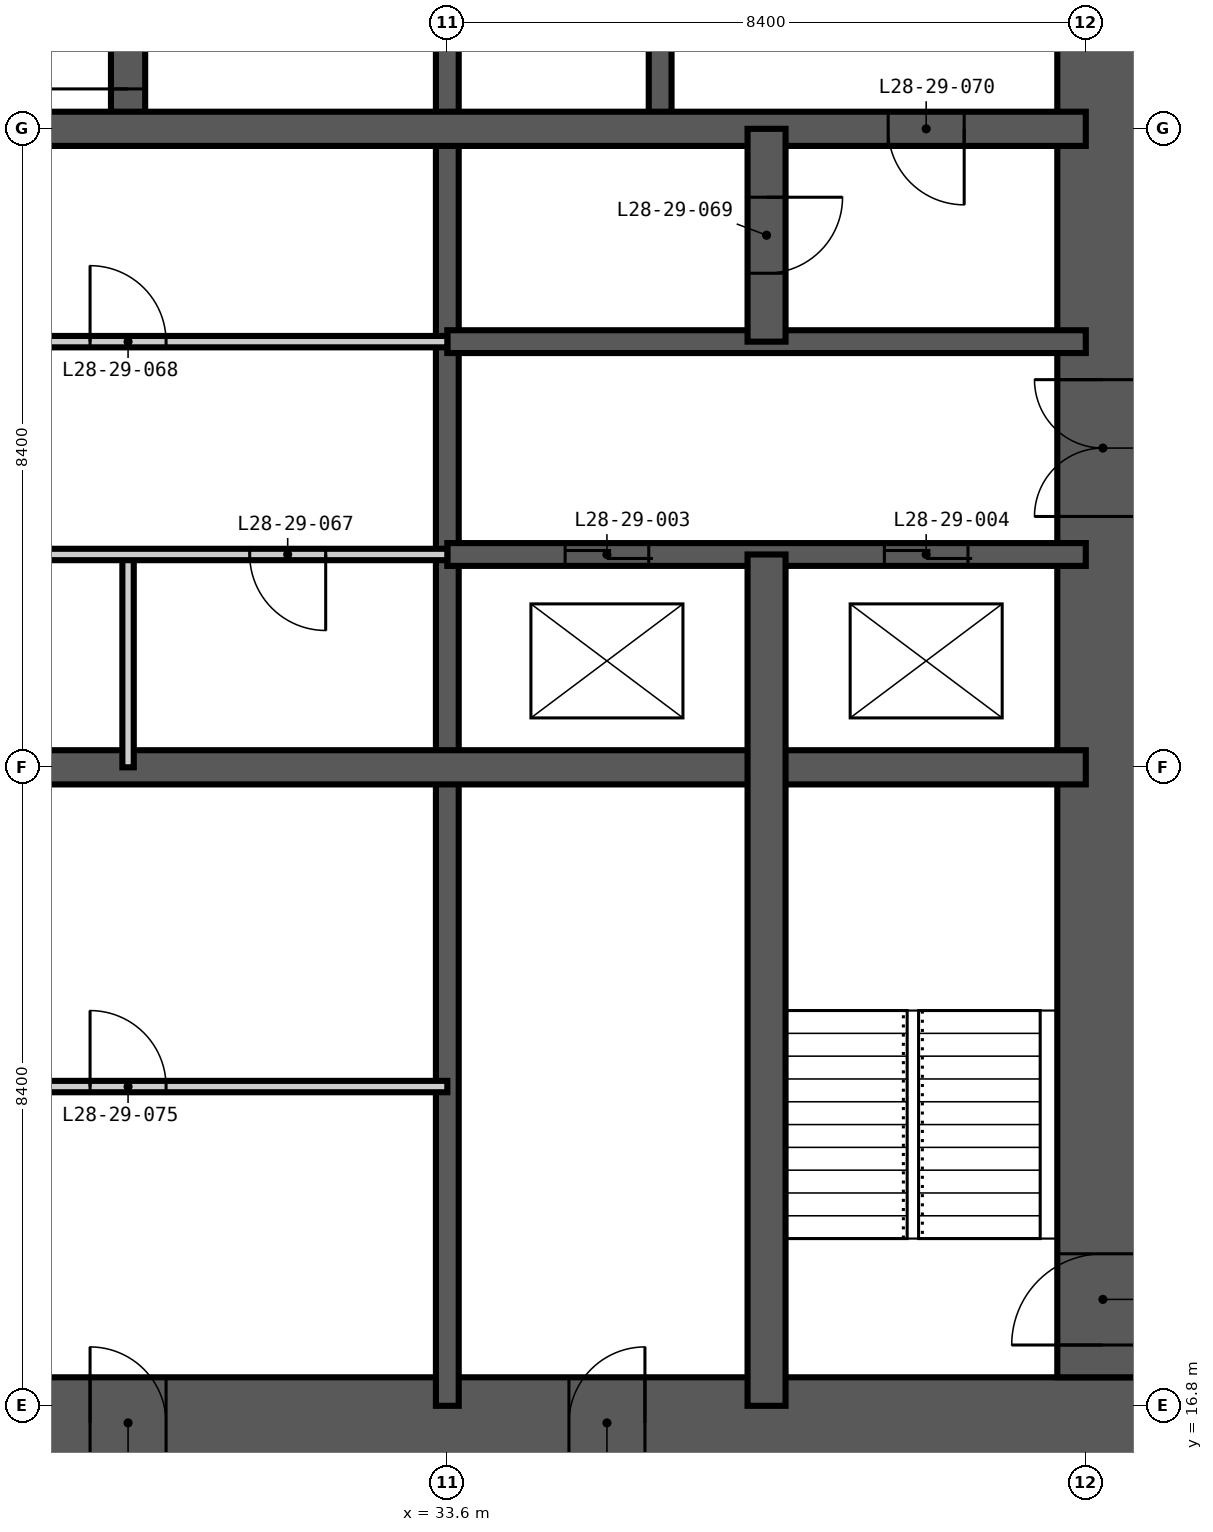
"""IFC4 building model, lengths in metres.
Left out: names, types, materials, properties, quantities, classifications, styles, units other than length and angle.
Written with IfcOpenShell. Run it as: python <this file> out.ifc"""

import sys

from ifc_helpers import new_model, si_unit, direction, frame, frame_2d, origin, place, context, subcontext, project, spatial, rectangle, extrude, element, fill, save


model = new_model("IFC4")
c1 = context("Model", 3, precision=1e-05, world=origin(), true_north=direction((0.0, 1.0)))
c2 = subcontext(c1, "Body", "Model", "MODEL_VIEW")
j1 = project(units=[si_unit("LENGTHUNIT", "METRE"), si_unit("PLANEANGLEUNIT", "RADIAN")], contexts=[c1])
p1 = place(None, origin())
s1 = spatial("IfcSite", under=j1, at=p1, CompositionType="ELEMENT")
p2 = place(p1, origin())
s2 = spatial("IfcBuilding", under=s1, at=p2, CompositionType="ELEMENT")
p3 = place(p2, frame((0.0, 0.0, 111.6)))
s3 = spatial("IfcBuildingStorey", under=s2, at=p3, CompositionType="ELEMENT", Elevation=111.6)
p4 = place(p3, frame((15.975, 16.575, -0.35), z_axis=(0.0, 0.0, 1.0), x_axis=(1.0, 0.0, 0.0)))
e1 = element("IfcWall", 1, at=p4, inside=s3, PredefinedType="SHEAR", context=c2, shape_type="SweptSolid", body=[
    extrude(rectangle(XDim=26.85, YDim=1.2, at=frame_2d((13.425, 0.0))), origin(), (0.0, 0.0, 1.0), 3.6),
])
p5 = place(p4, frame((12.925, 0.0, 0.35)))
e2 = element("IfcOpeningElement", 2, at=p5, cuts=e1, PredefinedType="OPENING", context=c2, shape_type="SweptSolid", body=[
    extrude(rectangle(XDim=1.0, YDim=2.1, at=frame_2d((0.5, 1.05))), frame((0.0, 0.61, 0.0), z_axis=(0.0, -1.0, 0.0), x_axis=(1.0, 0.0, 0.0)), (0.0, 0.0, 1.0), 1.22),
])
p6 = place(p4, frame((19.225, 0.0, 0.35)))
e3 = element("IfcOpeningElement", 3, at=p6, cuts=e1, PredefinedType="OPENING", context=c2, shape_type="SweptSolid", body=[
    extrude(rectangle(XDim=1.0, YDim=2.1, at=frame_2d((0.5, 1.05))), frame((0.0, 0.61, 0.0), z_axis=(0.0, -1.0, 0.0), x_axis=(1.0, 0.0, 0.0)), (0.0, 0.0, 1.0), 1.22),
])
p7 = place(p3, frame((42.225, 17.175, -0.35), z_axis=(0.0, 0.0, 1.0), x_axis=(0.0, 1.0, 0.0)))
e4 = element("IfcWall", 4, at=p7, inside=s3, PredefinedType="SHEAR", context=c2, shape_type="SweptSolid", body=[
    extrude(rectangle(XDim=24.45, YDim=1.2, at=frame_2d((12.225, 0.0))), origin(), (0.0, 0.0, 1.0), 3.6),
])
p8 = place(p7, frame((0.425, 0.0, 0.35)))
e5 = element("IfcOpeningElement", 5, at=p8, cuts=e4, PredefinedType="OPENING", context=c2, shape_type="SweptSolid", body=[
    extrude(rectangle(XDim=1.2, YDim=2.2, at=frame_2d((0.6, 1.1))), frame((0.0, 0.61, 0.0), z_axis=(0.0, -1.0, 0.0), x_axis=(1.0, 0.0, 0.0)), (0.0, 0.0, 1.0), 1.22),
])
p9 = place(p7, frame((11.325, 0.0, 0.35)))
e6 = element("IfcOpeningElement", 6, at=p9, cuts=e4, PredefinedType="OPENING", context=c2, shape_type="SweptSolid", body=[
    extrude(rectangle(XDim=1.8, YDim=2.2, at=frame_2d((0.9, 1.1))), frame((0.0, 0.61, 0.0), z_axis=(0.0, -1.0, 0.0), x_axis=(1.0, 0.0, 0.0)), (0.0, 0.0, 1.0), 1.22),
])
p10 = place(p7, frame((20.125, 0.0, 0.35)))
e7 = element("IfcOpeningElement", 7, at=p10, cuts=e4, PredefinedType="OPENING", context=c2, shape_type="SweptSolid", body=[
    extrude(rectangle(XDim=1.0, YDim=2.1, at=frame_2d((0.5, 1.05))), frame((0.0, 0.61, 0.0), z_axis=(0.0, -1.0, 0.0), x_axis=(1.0, 0.0, 0.0)), (0.0, 0.0, 1.0), 1.22),
])
p11 = place(p3, frame((33.6, 16.8, -0.35), z_axis=(0.0, 0.0, 1.0), x_axis=(0.0, 1.0, 0.0)))
e8 = element("IfcWall", 8, at=p11, inside=s3, PredefinedType="SHEAR", context=c2, shape_type="SweptSolid", body=[
    extrude(rectangle(XDim=25.2, YDim=0.3, at=frame_2d((12.6, 0.0))), origin(), (0.0, 0.0, 1.0), 3.6),
])
p12 = place(p11, frame((22.5, 0.0, 0.35)))
e9 = element("IfcOpeningElement", 9, at=p12, cuts=e8, PredefinedType="OPENING", context=c2, shape_type="SweptSolid", body=[
    extrude(rectangle(XDim=1.2, YDim=2.2, at=frame_2d((0.6, 1.1))), frame((0.0, 0.16, 0.0), z_axis=(0.0, -1.0, 0.0), x_axis=(1.0, 0.0, 0.0)), (0.0, 0.0, 1.0), 0.32),
])
p13 = place(p11, frame((18.3, 0.0, 0.35)))
e10 = element("IfcOpeningElement", 10, at=p13, cuts=e8, PredefinedType="OPENING", context=c2, shape_type="SweptSolid", body=[
    extrude(rectangle(XDim=1.2, YDim=2.2, at=frame_2d((0.6, 1.1))), frame((0.0, 0.16, 0.0), z_axis=(0.0, -1.0, 0.0), x_axis=(1.0, 0.0, 0.0)), (0.0, 0.0, 1.0), 0.32),
])
p14 = place(p3, frame((36.4, 33.6, -0.35), z_axis=(0.0, 0.0, 1.0), x_axis=(0.0, 1.0, 0.0)))
e11 = element("IfcWall", 11, at=p14, inside=s3, PredefinedType="SHEAR", context=c2, shape_type="SweptSolid", body=[
    extrude(rectangle(XDim=8.4, YDim=0.3, at=frame_2d((4.2, 0.0))), origin(), (0.0, 0.0, 1.0), 3.6),
])
p15 = place(p3, frame((33.6, 28.0, -0.35), z_axis=(0.0, 0.0, 1.0), x_axis=(1.0, 0.0, 0.0)))
e12 = element("IfcWall", 12, at=p15, inside=s3, PredefinedType="SHEAR", context=c2, shape_type="SweptSolid", body=[
    extrude(rectangle(XDim=8.4, YDim=0.3, at=frame_2d((4.2, 0.0))), origin(), (0.0, 0.0, 1.0), 3.6),
])
p16 = place(p15, frame((1.55, 0.0, 0.35)))
e13 = element("IfcOpeningElement", 13, at=p16, cuts=e12, PredefinedType="OPENING", context=c2, shape_type="SweptSolid", body=[
    extrude(rectangle(XDim=1.1, YDim=2.2, at=frame_2d((0.55, 1.1))), frame((0.0, 0.16, 0.0), z_axis=(0.0, -1.0, 0.0), x_axis=(1.0, 0.0, 0.0)), (0.0, 0.0, 1.0), 0.32),
])
p17 = place(p15, frame((5.75, 0.0, 0.35)))
e14 = element("IfcOpeningElement", 14, at=p17, cuts=e12, PredefinedType="OPENING", context=c2, shape_type="SweptSolid", body=[
    extrude(rectangle(XDim=1.1, YDim=2.2, at=frame_2d((0.55, 1.1))), frame((0.0, 0.16, 0.0), z_axis=(0.0, -1.0, 0.0), x_axis=(1.0, 0.0, 0.0)), (0.0, 0.0, 1.0), 0.32),
])
p18 = place(p3, frame((33.6, 30.8, -0.35), z_axis=(0.0, 0.0, 1.0), x_axis=(1.0, 0.0, 0.0)))
e15 = element("IfcWall", 15, at=p18, inside=s3, PredefinedType="SHEAR", context=c2, shape_type="SweptSolid", body=[
    extrude(rectangle(XDim=8.4, YDim=0.3, at=frame_2d((4.2, 0.0))), origin(), (0.0, 0.0, 1.0), 3.6),
])
p19 = place(p3, frame((29.4, 33.6, -0.35), z_axis=(0.0, 0.0, 1.0), x_axis=(0.0, 1.0, 0.0)))
e16 = element("IfcWall", 16, at=p19, inside=s3, PredefinedType="SHEAR", context=c2, shape_type="SweptSolid", body=[
    extrude(rectangle(XDim=8.4, YDim=0.45, at=frame_2d((4.2, 0.0))), origin(), (0.0, 0.0, 1.0), 3.6),
])
p20 = place(p19, frame((0.525, 0.0, 0.35)))
e17 = element("IfcOpeningElement", 17, at=p20, cuts=e16, PredefinedType="OPENING", context=c2, shape_type="SweptSolid", body=[
    extrude(rectangle(XDim=1.2, YDim=2.2, at=frame_2d((0.6, 1.1))), frame((0.0, 0.235, 0.0), z_axis=(0.0, -1.0, 0.0), x_axis=(1.0, 0.0, 0.0)), (0.0, 0.0, 1.0), 0.47),
])
p21 = place(p3, frame((16.8, 25.2, -0.35), z_axis=(0.0, 0.0, 1.0), x_axis=(1.0, 0.0, 0.0)))
e18 = element("IfcWall", 18, at=p21, inside=s3, PredefinedType="SHEAR", context=c2, shape_type="SweptSolid", body=[
    extrude(rectangle(XDim=25.2, YDim=0.45, at=frame_2d((12.6, 0.0))), origin(), (0.0, 0.0, 1.0), 3.6),
])
p22 = place(p3, frame((16.8, 33.6, -0.35), z_axis=(0.0, 0.0, 1.0), x_axis=(1.0, 0.0, 0.0)))
e19 = element("IfcWall", 19, at=p22, inside=s3, PredefinedType="SHEAR", context=c2, shape_type="SweptSolid", body=[
    extrude(rectangle(XDim=25.2, YDim=0.45, at=frame_2d((12.6, 0.0))), origin(), (0.0, 0.0, 1.0), 3.6),
])
p23 = place(p22, frame((22.6, 0.0, 0.35)))
e20 = element("IfcOpeningElement", 20, at=p23, cuts=e19, PredefinedType="OPENING", context=c2, shape_type="SweptSolid", body=[
    extrude(rectangle(XDim=1.0, YDim=2.1, at=frame_2d((0.5, 1.05))), frame((0.0, 0.235, 0.0), z_axis=(0.0, -1.0, 0.0), x_axis=(1.0, 0.0, 0.0)), (0.0, 0.0, 1.0), 0.47),
])
p24 = place(p3, frame((37.8, 16.8, -0.35), z_axis=(0.0, 0.0, 1.0), x_axis=(0.0, 1.0, 0.0)))
e21 = element("IfcWall", 21, at=p24, inside=s3, PredefinedType="SHEAR", context=c2, shape_type="SweptSolid", body=[
    extrude(rectangle(XDim=11.2, YDim=0.5, at=frame_2d((5.6, 0.0))), origin(), (0.0, 0.0, 1.0), 3.6),
])
p25 = place(p3, frame((37.8, 30.8, -0.35), z_axis=(0.0, 0.0, 1.0), x_axis=(0.0, 1.0, 0.0)))
e22 = element("IfcWall", 22, at=p25, inside=s3, PredefinedType="SHEAR", context=c2, shape_type="SweptSolid", body=[
    extrude(rectangle(XDim=2.8, YDim=0.5, at=frame_2d((1.4, 0.0))), origin(), (0.0, 0.0, 1.0), 3.6),
])
p26 = place(p25, frame((0.9, 0.0, 0.35)))
e23 = element("IfcOpeningElement", 23, at=p26, cuts=e22, PredefinedType="OPENING", context=c2, shape_type="SweptSolid", body=[
    extrude(rectangle(XDim=1.0, YDim=2.1, at=frame_2d((0.5, 1.05))), frame((0.0, 0.26, 0.0), z_axis=(0.0, -1.0, 0.0), x_axis=(1.0, 0.0, 0.0)), (0.0, 0.0, 1.0), 0.52),
])
p27 = place(p3, frame((29.4, 25.2, 0.0), z_axis=(0.0, 0.0, 1.0), x_axis=(0.0, 1.0, 0.0)))
e24 = element("IfcWall", 24, at=p27, inside=s3, PredefinedType="PARTITIONING", context=c2, shape_type="SweptSolid", body=[
    extrude(rectangle(XDim=2.8, YDim=0.15, at=frame_2d((1.4, 0.0))), origin(), (0.0, 0.0, 1.0), 3.25),
])
p28 = place(p3, frame((25.2, 21.0, 0.0), z_axis=(0.0, 0.0, 1.0), x_axis=(1.0, 0.0, 0.0)))
e25 = element("IfcWall", 25, at=p28, inside=s3, PredefinedType="PARTITIONING", context=c2, shape_type="SweptSolid", body=[
    extrude(rectangle(XDim=8.4, YDim=0.15, at=frame_2d((4.2, 0.0))), origin(), (0.0, 0.0, 1.0), 3.25),
])
p29 = place(p28, frame((3.7, 0.0, 0.0)))
e26 = element("IfcOpeningElement", 26, at=p29, cuts=e25, PredefinedType="OPENING", context=c2, shape_type="SweptSolid", body=[
    extrude(rectangle(XDim=1.0, YDim=2.1, at=frame_2d((0.5, 1.05))), frame((0.0, 0.085, 0.0), z_axis=(0.0, -1.0, 0.0), x_axis=(1.0, 0.0, 0.0)), (0.0, 0.0, 1.0), 0.17),
])
p30 = place(p3, frame((25.2, 28.0, 0.0), z_axis=(0.0, 0.0, 1.0), x_axis=(1.0, 0.0, 0.0)))
e27 = element("IfcWall", 27, at=p30, inside=s3, PredefinedType="PARTITIONING", context=c2, shape_type="SweptSolid", body=[
    extrude(rectangle(XDim=8.4, YDim=0.15, at=frame_2d((4.2, 0.0))), origin(), (0.0, 0.0, 1.0), 3.25),
])
p31 = place(p30, frame((1.6, 0.0, 0.0)))
e28 = element("IfcOpeningElement", 28, at=p31, cuts=e27, PredefinedType="OPENING", context=c2, shape_type="SweptSolid", body=[
    extrude(rectangle(XDim=1.0, YDim=2.1, at=frame_2d((0.5, 1.05))), frame((0.0, 0.085, 0.0), z_axis=(0.0, -1.0, 0.0), x_axis=(1.0, 0.0, 0.0)), (0.0, 0.0, 1.0), 0.17),
])
p32 = place(p30, frame((5.8, 0.0, 0.0)))
e29 = element("IfcOpeningElement", 29, at=p32, cuts=e27, PredefinedType="OPENING", context=c2, shape_type="SweptSolid", body=[
    extrude(rectangle(XDim=1.0, YDim=2.1, at=frame_2d((0.5, 1.05))), frame((0.0, 0.085, 0.0), z_axis=(0.0, -1.0, 0.0), x_axis=(1.0, 0.0, 0.0)), (0.0, 0.0, 1.0), 0.17),
])
p33 = place(p3, frame((25.2, 30.8, 0.0), z_axis=(0.0, 0.0, 1.0), x_axis=(1.0, 0.0, 0.0)))
e30 = element("IfcWall", 30, at=p33, inside=s3, PredefinedType="PARTITIONING", context=c2, shape_type="SweptSolid", body=[
    extrude(rectangle(XDim=8.4, YDim=0.15, at=frame_2d((4.2, 0.0))), origin(), (0.0, 0.0, 1.0), 3.25),
])
p34 = place(p33, frame((3.7, 0.0, 0.0)))
e31 = element("IfcOpeningElement", 31, at=p34, cuts=e30, PredefinedType="OPENING", context=c2, shape_type="SweptSolid", body=[
    extrude(rectangle(XDim=1.0, YDim=2.1, at=frame_2d((0.5, 1.05))), frame((0.0, 0.085, 0.0), z_axis=(0.0, -1.0, 0.0), x_axis=(1.0, 0.0, 0.0)), (0.0, 0.0, 1.0), 0.17),
])
p35 = place(p20, origin())
e32 = element("IfcDoor", 32, at=p35, inside=s3, OperationType="SINGLE_SWING_LEFT", PredefinedType="DOOR", context=c2, shape_type="SweptSolid", body=[
    extrude(rectangle(XDim=1.2, YDim=2.2, at=frame_2d((0.6, 1.1))), frame((0.0, 0.025, 0.0), z_axis=(0.0, -1.0, 0.0), x_axis=(1.0, 0.0, 0.0)), (0.0, 0.0, 1.0), 0.05),
])
fill(e17, e32)
p36 = place(p8, origin())
e33 = element("IfcDoor", 33, at=p36, inside=s3, OperationType="SINGLE_SWING_LEFT", PredefinedType="DOOR", context=c2, shape_type="SweptSolid", body=[
    extrude(rectangle(XDim=1.2, YDim=2.2, at=frame_2d((0.6, 1.1))), frame((0.0, 0.025, 0.0), z_axis=(0.0, -1.0, 0.0), x_axis=(1.0, 0.0, 0.0)), (0.0, 0.0, 1.0), 0.05),
])
fill(e5, e33)
p37 = place(p16, origin())
e34 = element("IfcDoor", 34, at=p37, inside=s3, OperationType="DOUBLE_DOOR_SLIDING", PredefinedType="DOOR", context=c2, shape_type="SweptSolid", body=[
    extrude(rectangle(XDim=1.1, YDim=2.2, at=frame_2d((0.55, 1.1))), frame((0.0, 0.025, 0.0), z_axis=(0.0, -1.0, 0.0), x_axis=(1.0, 0.0, 0.0)), (0.0, 0.0, 1.0), 0.05),
])
fill(e13, e34)
p38 = place(p17, origin())
e35 = element("IfcDoor", 35, at=p38, inside=s3, OperationType="DOUBLE_DOOR_SLIDING", PredefinedType="DOOR", context=c2, shape_type="SweptSolid", body=[
    extrude(rectangle(XDim=1.1, YDim=2.2, at=frame_2d((0.55, 1.1))), frame((0.0, 0.025, 0.0), z_axis=(0.0, -1.0, 0.0), x_axis=(1.0, 0.0, 0.0)), (0.0, 0.0, 1.0), 0.05),
])
fill(e14, e35)
p39 = place(p32, frame((1.0, 0.0, 0.0), z_axis=(0.0, 0.0, 1.0), x_axis=(-1.0, 0.0, 0.0)))
e36 = element("IfcDoor", 36, at=p39, inside=s3, OperationType="SINGLE_SWING_LEFT", PredefinedType="DOOR", context=c2, shape_type="SweptSolid", body=[
    extrude(rectangle(XDim=1.0, YDim=2.1, at=frame_2d((0.5, 1.05))), frame((0.0, 0.025, 0.0), z_axis=(0.0, -1.0, 0.0), x_axis=(1.0, 0.0, 0.0)), (0.0, 0.0, 1.0), 0.05),
])
fill(e29, e36)
p40 = place(p34, origin())
e37 = element("IfcDoor", 37, at=p40, inside=s3, OperationType="SINGLE_SWING_LEFT", PredefinedType="DOOR", context=c2, shape_type="SweptSolid", body=[
    extrude(rectangle(XDim=1.0, YDim=2.1, at=frame_2d((0.5, 1.05))), frame((0.0, 0.025, 0.0), z_axis=(0.0, -1.0, 0.0), x_axis=(1.0, 0.0, 0.0)), (0.0, 0.0, 1.0), 0.05),
])
fill(e31, e37)
p41 = place(p26, frame((1.0, 0.0, 0.0), z_axis=(0.0, 0.0, 1.0), x_axis=(-1.0, 0.0, 0.0)))
e38 = element("IfcDoor", 38, at=p41, inside=s3, OperationType="SINGLE_SWING_LEFT", PredefinedType="DOOR", context=c2, shape_type="SweptSolid", body=[
    extrude(rectangle(XDim=1.0, YDim=2.1, at=frame_2d((0.5, 1.05))), frame((0.0, 0.025, 0.0), z_axis=(0.0, -1.0, 0.0), x_axis=(1.0, 0.0, 0.0)), (0.0, 0.0, 1.0), 0.05),
])
fill(e23, e38)
p42 = place(p23, frame((1.0, 0.0, 0.0), z_axis=(0.0, 0.0, 1.0), x_axis=(-1.0, 0.0, 0.0)))
e39 = element("IfcDoor", 39, at=p42, inside=s3, OperationType="SINGLE_SWING_LEFT", PredefinedType="DOOR", context=c2, shape_type="SweptSolid", body=[
    extrude(rectangle(XDim=1.0, YDim=2.1, at=frame_2d((0.5, 1.05))), frame((0.0, 0.025, 0.0), z_axis=(0.0, -1.0, 0.0), x_axis=(1.0, 0.0, 0.0)), (0.0, 0.0, 1.0), 0.05),
])
fill(e20, e39)
p43 = place(p9, origin())
e40 = element("IfcDoor", 40, at=p43, inside=s3, OperationType="DOUBLE_DOOR_DOUBLE_SWING", PredefinedType="DOOR", context=c2, shape_type="SweptSolid", body=[
    extrude(rectangle(XDim=1.8, YDim=2.2, at=frame_2d((0.9, 1.1))), frame((0.0, 0.025, 0.0), z_axis=(0.0, -1.0, 0.0), x_axis=(1.0, 0.0, 0.0)), (0.0, 0.0, 1.0), 0.05),
])
fill(e6, e40)
p44 = place(p5, origin())
e41 = element("IfcDoor", 41, at=p44, inside=s3, OperationType="SINGLE_SWING_LEFT", PredefinedType="DOOR", context=c2, shape_type="SweptSolid", body=[
    extrude(rectangle(XDim=1.0, YDim=2.1, at=frame_2d((0.5, 1.05))), frame((0.0, 0.025, 0.0), z_axis=(0.0, -1.0, 0.0), x_axis=(1.0, 0.0, 0.0)), (0.0, 0.0, 1.0), 0.05),
])
fill(e2, e41)
p45 = place(p29, origin())
e42 = element("IfcDoor", 42, at=p45, inside=s3, OperationType="SINGLE_SWING_LEFT", PredefinedType="DOOR", context=c2, shape_type="SweptSolid", body=[
    extrude(rectangle(XDim=1.0, YDim=2.1, at=frame_2d((0.5, 1.05))), frame((0.0, 0.025, 0.0), z_axis=(0.0, -1.0, 0.0), x_axis=(1.0, 0.0, 0.0)), (0.0, 0.0, 1.0), 0.05),
])
fill(e26, e42)
p46 = place(p6, origin())
e43 = element("IfcDoor", 43, at=p46, inside=s3, OperationType="SINGLE_SWING_RIGHT", PredefinedType="DOOR", context=c2, shape_type="SweptSolid", body=[
    extrude(rectangle(XDim=1.0, YDim=2.1, at=frame_2d((0.5, 1.05))), frame((0.0, 0.025, 0.0), z_axis=(0.0, -1.0, 0.0), x_axis=(1.0, 0.0, 0.0)), (0.0, 0.0, 1.0), 0.05),
])
fill(e3, e43)
save(model, sys.argv[1])
